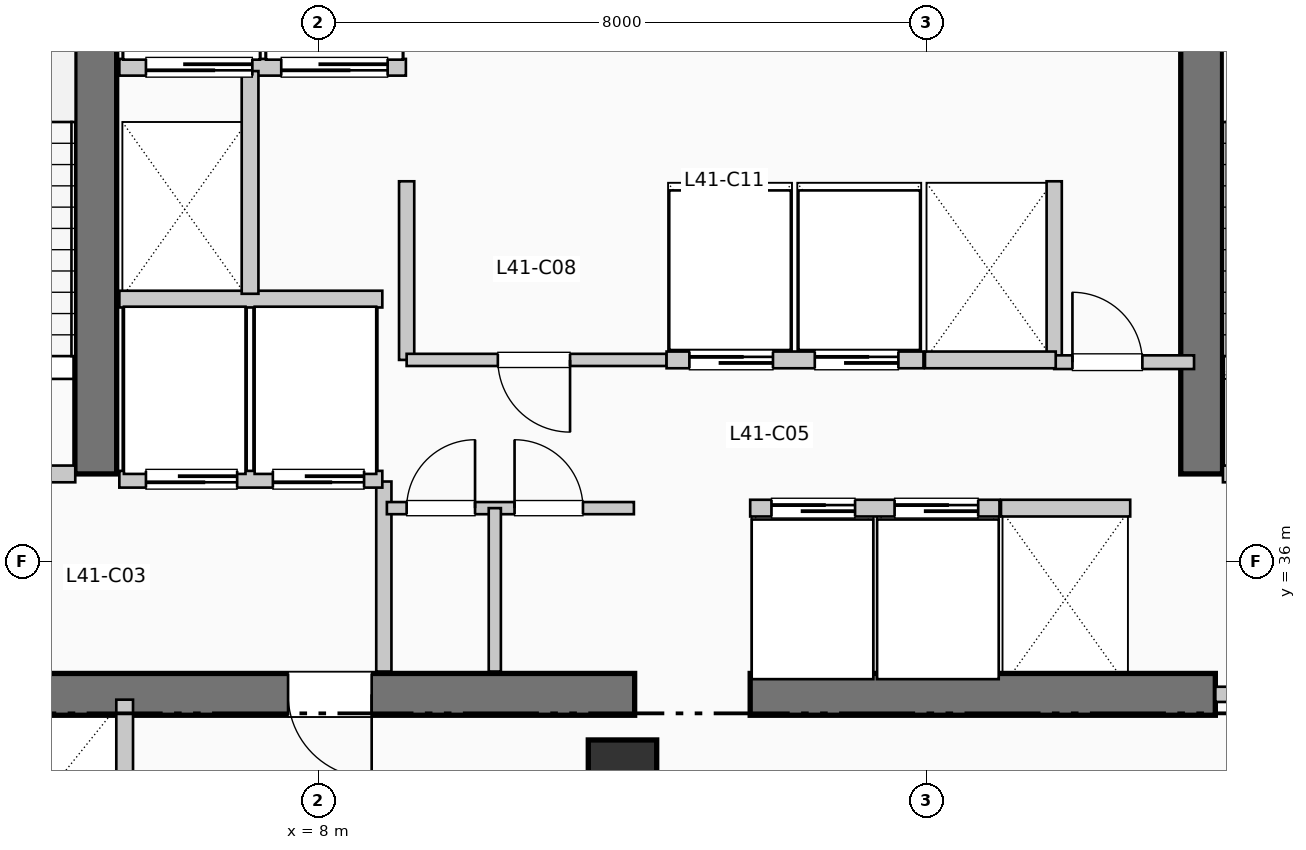
"""IFC4 building model, lengths in metres.
Left out: names, types, materials, properties, quantities, classifications, styles, units other than length and angle.
Written with IfcOpenShell. Run it as: python <this file> out.ifc"""

import sys

from ifc_helpers import new_model, si_unit, direction, frame, frame_2d, origin, origin_2d, place, context, subcontext, project, spatial, rectangle, extrude, element, fill, save


model = new_model("IFC4")
c1 = context("Model", 3, precision=1e-05, world=origin(), true_north=direction((0.0, 1.0)))
c2 = subcontext(c1, "Body", "Model", "MODEL_VIEW")
j1 = project(units=[si_unit("LENGTHUNIT", "METRE"), si_unit("PLANEANGLEUNIT", "RADIAN")], contexts=[c1])
p1 = place(None, origin())
s1 = spatial("IfcSite", under=j1, at=p1, CompositionType="ELEMENT")
p2 = place(p1, origin())
s2 = spatial("IfcBuilding", under=s1, at=p2, CompositionType="ELEMENT")
p3 = place(p2, frame((0.0, 0.0, 170.61)))
s3 = spatial("IfcBuildingStorey", under=s2, at=p3, CompositionType="ELEMENT", Elevation=170.61)
p4 = place(p3, frame((1.45, 34.25, 0.0), z_axis=(0.0, 0.0, 1.0), x_axis=(1.0, 0.0, 0.0)))
e1 = element("IfcWall", 1, at=p4, inside=s3, PredefinedType="SHEAR", context=c2, shape_type="SweptSolid", body=[
    extrude(rectangle(XDim=10.71, YDim=0.55, at=frame_2d((5.355, 0.0))), origin(), (0.0, 0.0, 1.0), 3.96),
])
p5 = place(p4, frame((7.25, 0.0, 0.0), z_axis=(0.0, 0.0, 1.0), x_axis=(-1.0, 0.0, 0.0)))
e2 = element("IfcOpeningElement", 2, at=p5, cuts=e1, PredefinedType="OPENING", context=c2, shape_type="SweptSolid", body=[
    extrude(rectangle(XDim=1.1, YDim=2.15, at=frame_2d((0.55, 1.075))), frame((0.0, 0.285, 0.0), z_axis=(0.0, -1.0, 0.0), x_axis=(1.0, 0.0, 0.0)), (0.0, 0.0, 1.0), 0.57),
])
p6 = place(p3, frame((13.68, 34.25, 0.0), z_axis=(0.0, 0.0, 1.0), x_axis=(1.0, 0.0, 0.0)))
e3 = element("IfcWall", 3, at=p6, inside=s3, PredefinedType="SHEAR", context=c2, shape_type="SweptSolid", body=[
    extrude(rectangle(XDim=6.12, YDim=0.55, at=frame_2d((3.06, 0.0))), origin(), (0.0, 0.0, 1.0), 3.96),
])
for number, where, z_axis, x_axis in (
    (4, (5.07, 37.15, 0.0), (0.0, 0.0, 1.0), (0.0, 1.0, 0.0)),
    (5, (19.62, 37.15, 0.0), (0.0, 0.0, 1.0), (0.0, 1.0, 0.0)),
):
    element("IfcWall", number, at=place(p3, frame(where, z_axis=z_axis, x_axis=x_axis)), inside=s3, PredefinedType="SHEAR", context=c2, shape_type="SweptSolid", body=[
        extrude(rectangle(XDim=7.89, YDim=0.55, at=frame_2d((3.945, 0.0))), origin(), (0.0, 0.0, 1.0), 3.96),
    ])
p7 = place(p3, frame((12.0, 33.2, 0.0), z_axis=(0.0, 0.0, 1.0), x_axis=(1.0, 0.0, 0.0)))
e6 = element("IfcColumn", 6, at=p7, inside=s3, PredefinedType="COLUMN", context=c2, shape_type="SweptSolid", body=[
    extrude(rectangle(XDim=0.9, YDim=0.9, at=origin_2d()), origin(), (0.0, 0.0, 1.0), 3.96),
])
p8 = place(p3, frame((1.65, 37.15, 0.0), z_axis=(0.0, 0.0, 1.0), x_axis=(1.0, 0.0, 0.0)))
e7 = element("IfcWall", 7, at=p8, inside=s3, PredefinedType="PARTITIONING", context=c2, shape_type="SweptSolid", body=[
    extrude(rectangle(XDim=3.15, YDim=0.22, at=frame_2d((1.575, 0.0))), origin(), (0.0, 0.0, 1.0), 3.61),
])
p9 = place(p8, frame((2.05, 0.0, 0.0), z_axis=(0.0, 0.0, 1.0), x_axis=(-1.0, 0.0, 0.0)))
e8 = element("IfcOpeningElement", 8, at=p9, cuts=e7, PredefinedType="OPENING", context=c2, shape_type="SweptSolid", body=[
    extrude(rectangle(XDim=1.05, YDim=2.15, at=frame_2d((0.525, 1.075))), frame((0.0, 0.12, 0.0), z_axis=(0.0, -1.0, 0.0), x_axis=(1.0, 0.0, 0.0)), (0.0, 0.0, 1.0), 0.24),
])
p10 = place(p3, frame((8.86, 34.55, 0.0), z_axis=(0.0, 0.0, 1.0), x_axis=(0.0, 1.0, 0.0)))
e9 = element("IfcWall", 9, at=p10, inside=s3, PredefinedType="PARTITIONING", context=c2, shape_type="SweptSolid", body=[
    extrude(rectangle(XDim=2.5, YDim=0.2, at=frame_2d((1.25, 0.0))), origin(), (0.0, 0.0, 1.0), 3.61),
])
p11 = place(p3, frame((19.9, 37.15, 0.0), z_axis=(0.0, 0.0, 1.0), x_axis=(1.0, 0.0, 0.0)))
e10 = element("IfcWall", 10, at=p11, inside=s3, PredefinedType="PARTITIONING", context=c2, shape_type="SweptSolid", body=[
    extrude(rectangle(XDim=3.15, YDim=0.22, at=frame_2d((1.575, 0.0))), origin(), (0.0, 0.0, 1.0), 3.61),
])
p12 = place(p11, frame((2.05, 0.0, 0.0), z_axis=(0.0, 0.0, 1.0), x_axis=(-1.0, 0.0, 0.0)))
e11 = element("IfcOpeningElement", 11, at=p12, cuts=e10, PredefinedType="OPENING", context=c2, shape_type="SweptSolid", body=[
    extrude(rectangle(XDim=1.05, YDim=2.15, at=frame_2d((0.525, 1.075))), frame((0.0, 0.12, 0.0), z_axis=(0.0, -1.0, 0.0), x_axis=(1.0, 0.0, 0.0)), (0.0, 0.0, 1.0), 0.24),
])
p13 = place(p3, frame((19.8, 34.25, 0.0), z_axis=(0.0, 0.0, 1.0), x_axis=(1.0, 0.0, 0.0)))
e12 = element("IfcWall", 12, at=p13, inside=s3, PredefinedType="PARTITIONING", context=c2, shape_type="SweptSolid", body=[
    extrude(rectangle(XDim=3.25, YDim=0.2, at=frame_2d((1.625, 0.0))), origin(), (0.0, 0.0, 1.0), 3.61),
])
p14 = place(p13, frame((2.15, 0.0, 0.0), z_axis=(0.0, 0.0, 1.0), x_axis=(-1.0, 0.0, 0.0)))
e13 = element("IfcOpeningElement", 13, at=p14, cuts=e12, PredefinedType="OPENING", context=c2, shape_type="SweptSolid", body=[
    extrude(rectangle(XDim=1.1, YDim=2.15, at=frame_2d((0.55, 1.075))), frame((0.0, 0.11, 0.0), z_axis=(0.0, -1.0, 0.0), x_axis=(1.0, 0.0, 0.0)), (0.0, 0.0, 1.0), 0.22),
])
p15 = place(p3, frame((5.38, 37.08, 0.0), z_axis=(0.0, 0.0, 1.0), x_axis=(1.0, 0.0, 0.0)))
e14 = element("IfcWall", 14, at=p15, inside=s3, PredefinedType="PARTITIONING", context=c2, shape_type="SweptSolid", body=[
    extrude(rectangle(XDim=3.46, YDim=0.22, at=frame_2d((1.73, 0.0))), origin(), (0.0, 0.0, 1.0), 3.61),
])
p16 = place(p15, frame((1.55, 0.0, 0.0), z_axis=(0.0, 0.0, 1.0), x_axis=(-1.0, 0.0, 0.0)))
e15 = element("IfcOpeningElement", 15, at=p16, cuts=e14, PredefinedType="OPENING", context=c2, shape_type="SweptSolid", body=[
    extrude(rectangle(XDim=1.2, YDim=2.2, at=frame_2d((0.6, 1.1))), frame((0.0, 0.12, 0.0), z_axis=(0.0, -1.0, 0.0), x_axis=(1.0, 0.0, 0.0)), (0.0, 0.0, 1.0), 0.24),
])
p17 = place(p15, frame((3.22, 0.0, 0.0), z_axis=(0.0, 0.0, 1.0), x_axis=(-1.0, 0.0, 0.0)))
e16 = element("IfcOpeningElement", 16, at=p17, cuts=e14, PredefinedType="OPENING", context=c2, shape_type="SweptSolid", body=[
    extrude(rectangle(XDim=1.2, YDim=2.2, at=frame_2d((0.6, 1.1))), frame((0.0, 0.12, 0.0), z_axis=(0.0, -1.0, 0.0), x_axis=(1.0, 0.0, 0.0)), (0.0, 0.0, 1.0), 0.24),
])
p18 = place(p3, frame((5.38, 39.45, 0.0), z_axis=(0.0, 0.0, 1.0), x_axis=(1.0, 0.0, 0.0)))
e17 = element("IfcWall", 17, at=p18, inside=s3, PredefinedType="PARTITIONING", context=c2, shape_type="SweptSolid", body=[
    extrude(rectangle(XDim=3.46, YDim=0.22, at=frame_2d((1.73, 0.0))), origin(), (0.0, 0.0, 1.0), 3.61),
])
p19 = place(p3, frame((5.38, 42.5, 0.0), z_axis=(0.0, 0.0, 1.0), x_axis=(1.0, 0.0, 0.0)))
e18 = element("IfcWall", 18, at=p19, inside=s3, PredefinedType="PARTITIONING", context=c2, shape_type="SweptSolid", body=[
    extrude(rectangle(XDim=3.77, YDim=0.22, at=frame_2d((1.885, 0.0))), origin(), (0.0, 0.0, 1.0), 3.61),
])
p20 = place(p19, frame((1.75, 0.0, 0.0), z_axis=(0.0, 0.0, 1.0), x_axis=(-1.0, 0.0, 0.0)))
e19 = element("IfcOpeningElement", 19, at=p20, cuts=e18, PredefinedType="OPENING", context=c2, shape_type="SweptSolid", body=[
    extrude(rectangle(XDim=1.4, YDim=2.2, at=frame_2d((0.7, 1.1))), frame((0.0, 0.12, 0.0), z_axis=(0.0, -1.0, 0.0), x_axis=(1.0, 0.0, 0.0)), (0.0, 0.0, 1.0), 0.24),
])
p21 = place(p19, frame((3.53, 0.0, 0.0), z_axis=(0.0, 0.0, 1.0), x_axis=(-1.0, 0.0, 0.0)))
e20 = element("IfcOpeningElement", 20, at=p21, cuts=e18, PredefinedType="OPENING", context=c2, shape_type="SweptSolid", body=[
    extrude(rectangle(XDim=1.4, YDim=2.2, at=frame_2d((0.7, 1.1))), frame((0.0, 0.12, 0.0), z_axis=(0.0, -1.0, 0.0), x_axis=(1.0, 0.0, 0.0)), (0.0, 0.0, 1.0), 0.24),
])
p22 = place(p3, frame((7.1, 39.52, 0.0), z_axis=(0.0, 0.0, 1.0), x_axis=(0.0, 1.0, 0.0)))
e21 = element("IfcWall", 21, at=p22, inside=s3, PredefinedType="PARTITIONING", context=c2, shape_type="SweptSolid", body=[
    extrude(rectangle(XDim=2.93, YDim=0.22, at=frame_2d((1.465, 0.0))), origin(), (0.0, 0.0, 1.0), 3.61),
])
p23 = place(p3, frame((5.45, 31.8, 0.0), z_axis=(0.0, 0.0, 1.0), x_axis=(0.0, 1.0, 0.0)))
e22 = element("IfcWall", 22, at=p23, inside=s3, PredefinedType="PARTITIONING", context=c2, shape_type="SweptSolid", body=[
    extrude(rectangle(XDim=2.38, YDim=0.22, at=frame_2d((1.19, 0.0))), origin(), (0.0, 0.0, 1.0), 3.61),
])
for number, where, z_axis, x_axis in (
    (23, (9.16, 38.65, 0.0), (0.0, 0.0, 1.0), (0.0, 1.0, 0.0)),
    (24, (17.68, 38.65, 0.0), (0.0, 0.0, 1.0), (0.0, 1.0, 0.0)),
):
    element("IfcWall", number, at=place(p3, frame(where, z_axis=z_axis, x_axis=x_axis)), inside=s3, PredefinedType="PARTITIONING", context=c2, shape_type="SweptSolid", body=[
        extrude(rectangle(XDim=2.35, YDim=0.2, at=frame_2d((1.175, 0.0))), origin(), (0.0, 0.0, 1.0), 3.61),
    ])
p24 = place(p3, frame((17.68, 38.62, 0.0), z_axis=(0.0, 0.0, 1.0), x_axis=(1.0, 0.0, 0.0)))
e25 = element("IfcWall", 25, at=p24, inside=s3, PredefinedType="PARTITIONING", context=c2, shape_type="SweptSolid", body=[
    extrude(rectangle(XDim=1.84, YDim=0.18, at=frame_2d((0.92, 0.0))), origin(), (0.0, 0.0, 1.0), 3.61),
])
p25 = place(p24, frame((0.24, 0.0, 0.0)))
e26 = element("IfcOpeningElement", 26, at=p25, cuts=e25, PredefinedType="OPENING", context=c2, shape_type="SweptSolid", body=[
    extrude(rectangle(XDim=0.92, YDim=2.1, at=frame_2d((0.46, 1.05))), frame((0.0, 0.1, 0.0), z_axis=(0.0, -1.0, 0.0), x_axis=(1.0, 0.0, 0.0)), (0.0, 0.0, 1.0), 0.2),
])
p26 = place(p3, frame((8.9, 36.7, 0.0), z_axis=(0.0, 0.0, 1.0), x_axis=(1.0, 0.0, 0.0)))
e27 = element("IfcWall", 27, at=p26, inside=s3, PredefinedType="PARTITIONING", context=c2, shape_type="SweptSolid", body=[
    extrude(rectangle(XDim=3.25, YDim=0.16, at=frame_2d((1.625, 0.0))), origin(), (0.0, 0.0, 1.0), 3.61),
])
p27 = place(p26, frame((0.26, 0.0, 0.0)))
e28 = element("IfcOpeningElement", 28, at=p27, cuts=e27, PredefinedType="OPENING", context=c2, shape_type="SweptSolid", body=[
    extrude(rectangle(XDim=0.9, YDim=2.15, at=frame_2d((0.45, 1.075))), frame((0.0, 0.09, 0.0), z_axis=(0.0, -1.0, 0.0), x_axis=(1.0, 0.0, 0.0)), (0.0, 0.0, 1.0), 0.18),
])
p28 = place(p26, frame((1.68, 0.0, 0.0)))
e29 = element("IfcOpeningElement", 29, at=p28, cuts=e27, PredefinedType="OPENING", context=c2, shape_type="SweptSolid", body=[
    extrude(rectangle(XDim=0.9, YDim=2.15, at=frame_2d((0.45, 1.075))), frame((0.0, 0.09, 0.0), z_axis=(0.0, -1.0, 0.0), x_axis=(1.0, 0.0, 0.0)), (0.0, 0.0, 1.0), 0.18),
])
p29 = place(p3, frame((10.32, 34.55, 0.0), z_axis=(0.0, 0.0, 1.0), x_axis=(0.0, 1.0, 0.0)))
e30 = element("IfcWall", 30, at=p29, inside=s3, PredefinedType="PARTITIONING", context=c2, shape_type="SweptSolid", body=[
    extrude(rectangle(XDim=2.15, YDim=0.16, at=frame_2d((1.075, 0.0))), origin(), (0.0, 0.0, 1.0), 3.61),
])
p30 = place(p3, frame((9.16, 38.65, 0.0), z_axis=(0.0, 0.0, 1.0), x_axis=(1.0, 0.0, 0.0)))
e31 = element("IfcWall", 31, at=p30, inside=s3, PredefinedType="PARTITIONING", context=c2, shape_type="SweptSolid", body=[
    extrude(rectangle(XDim=3.42, YDim=0.16, at=frame_2d((1.71, 0.0))), origin(), (0.0, 0.0, 1.0), 3.61),
])
p31 = place(p30, frame((2.15, 0.0, 0.0), z_axis=(0.0, 0.0, 1.0), x_axis=(-1.0, 0.0, 0.0)))
e32 = element("IfcOpeningElement", 32, at=p31, cuts=e31, PredefinedType="OPENING", context=c2, shape_type="SweptSolid", body=[
    extrude(rectangle(XDim=0.95, YDim=2.15, at=frame_2d((0.475, 1.075))), frame((0.0, 0.09, 0.0), z_axis=(0.0, -1.0, 0.0), x_axis=(1.0, 0.0, 0.0)), (0.0, 0.0, 1.0), 0.18),
])
p32 = place(p3, frame((13.68, 36.7, 0.0), z_axis=(0.0, 0.0, 1.0), x_axis=(1.0, 0.0, 0.0)))
e33 = element("IfcWall", 33, at=p32, inside=s3, PredefinedType="PARTITIONING", context=c2, shape_type="SweptSolid", body=[
    extrude(rectangle(XDim=3.28, YDim=0.22, at=frame_2d((1.64, 0.0))), origin(), (0.0, 0.0, 1.0), 3.61),
])
p33 = place(p32, frame((0.28, 0.0, 0.0)))
e34 = element("IfcOpeningElement", 34, at=p33, cuts=e33, PredefinedType="OPENING", context=c2, shape_type="SweptSolid", body=[
    extrude(rectangle(XDim=1.1, YDim=2.2, at=frame_2d((0.55, 1.1))), frame((0.0, 0.12, 0.0), z_axis=(0.0, -1.0, 0.0), x_axis=(1.0, 0.0, 0.0)), (0.0, 0.0, 1.0), 0.24),
])
p34 = place(p32, frame((1.9, 0.0, 0.0)))
e35 = element("IfcOpeningElement", 35, at=p34, cuts=e33, PredefinedType="OPENING", context=c2, shape_type="SweptSolid", body=[
    extrude(rectangle(XDim=1.1, YDim=2.2, at=frame_2d((0.55, 1.1))), frame((0.0, 0.12, 0.0), z_axis=(0.0, -1.0, 0.0), x_axis=(1.0, 0.0, 0.0)), (0.0, 0.0, 1.0), 0.24),
])
p35 = place(p3, frame((12.58, 38.65, 0.0), z_axis=(0.0, 0.0, 1.0), x_axis=(1.0, 0.0, 0.0)))
e36 = element("IfcWall", 36, at=p35, inside=s3, PredefinedType="PARTITIONING", context=c2, shape_type="SweptSolid", body=[
    extrude(rectangle(XDim=3.38, YDim=0.22, at=frame_2d((1.69, 0.0))), origin(), (0.0, 0.0, 1.0), 3.61),
])
p36 = place(p35, frame((0.3, 0.0, 0.0)))
e37 = element("IfcOpeningElement", 37, at=p36, cuts=e36, PredefinedType="OPENING", context=c2, shape_type="SweptSolid", body=[
    extrude(rectangle(XDim=1.1, YDim=2.2, at=frame_2d((0.55, 1.1))), frame((0.0, 0.12, 0.0), z_axis=(0.0, -1.0, 0.0), x_axis=(1.0, 0.0, 0.0)), (0.0, 0.0, 1.0), 0.24),
])
p37 = place(p35, frame((1.95, 0.0, 0.0)))
e38 = element("IfcOpeningElement", 38, at=p37, cuts=e36, PredefinedType="OPENING", context=c2, shape_type="SweptSolid", body=[
    extrude(rectangle(XDim=1.1, YDim=2.2, at=frame_2d((0.55, 1.1))), frame((0.0, 0.12, 0.0), z_axis=(0.0, -1.0, 0.0), x_axis=(1.0, 0.0, 0.0)), (0.0, 0.0, 1.0), 0.24),
])
p38 = place(p3, frame((16.98, 36.7, 0.0), z_axis=(0.0, 0.0, 1.0), x_axis=(1.0, 0.0, 0.0)))
e39 = element("IfcWall", 39, at=p38, inside=s3, PredefinedType="PARTITIONING", context=c2, shape_type="SweptSolid", body=[
    extrude(rectangle(XDim=1.7, YDim=0.22, at=frame_2d((0.85, 0.0))), origin(), (0.0, 0.0, 1.0), 3.61),
])
p39 = place(p3, frame((15.98, 38.65, 0.0), z_axis=(0.0, 0.0, 1.0), x_axis=(1.0, 0.0, 0.0)))
e40 = element("IfcWall", 40, at=p39, inside=s3, PredefinedType="PARTITIONING", context=c2, shape_type="SweptSolid", body=[
    extrude(rectangle(XDim=1.72, YDim=0.22, at=frame_2d((0.86, 0.0))), origin(), (0.0, 0.0, 1.0), 3.61),
])
p40 = place(p5, origin())
e41 = element("IfcDoor", 41, at=p40, inside=s3, OperationType="SINGLE_SWING_RIGHT", PredefinedType="DOOR", context=c2, shape_type="SweptSolid", body=[
    extrude(rectangle(XDim=1.1, YDim=2.15, at=frame_2d((0.55, 1.075))), frame((0.0, 0.025, 0.0), z_axis=(0.0, -1.0, 0.0), x_axis=(1.0, 0.0, 0.0)), (0.0, 0.0, 1.0), 0.05),
])
fill(e2, e41)
p41 = place(p16, origin())
e42 = element("IfcDoor", 42, at=p41, inside=s3, OperationType="SLIDING_TO_RIGHT", PredefinedType="DOOR", context=c2, shape_type="SweptSolid", body=[
    extrude(rectangle(XDim=1.2, YDim=2.2, at=frame_2d((0.6, 1.1))), frame((0.0, 0.025, 0.0), z_axis=(0.0, -1.0, 0.0), x_axis=(1.0, 0.0, 0.0)), (0.0, 0.0, 1.0), 0.05),
])
fill(e15, e42)
p42 = place(p17, origin())
e43 = element("IfcDoor", 43, at=p42, inside=s3, OperationType="SLIDING_TO_RIGHT", PredefinedType="DOOR", context=c2, shape_type="SweptSolid", body=[
    extrude(rectangle(XDim=1.2, YDim=2.2, at=frame_2d((0.6, 1.1))), frame((0.0, 0.025, 0.0), z_axis=(0.0, -1.0, 0.0), x_axis=(1.0, 0.0, 0.0)), (0.0, 0.0, 1.0), 0.05),
])
fill(e16, e43)
p43 = place(p20, origin())
e44 = element("IfcDoor", 44, at=p43, inside=s3, OperationType="SLIDING_TO_LEFT", PredefinedType="DOOR", context=c2, shape_type="SweptSolid", body=[
    extrude(rectangle(XDim=1.4, YDim=2.2, at=frame_2d((0.7, 1.1))), frame((0.0, 0.025, 0.0), z_axis=(0.0, -1.0, 0.0), x_axis=(1.0, 0.0, 0.0)), (0.0, 0.0, 1.0), 0.05),
])
fill(e19, e44)
p44 = place(p21, origin())
e45 = element("IfcDoor", 45, at=p44, inside=s3, OperationType="SLIDING_TO_LEFT", PredefinedType="DOOR", context=c2, shape_type="SweptSolid", body=[
    extrude(rectangle(XDim=1.4, YDim=2.2, at=frame_2d((0.7, 1.1))), frame((0.0, 0.025, 0.0), z_axis=(0.0, -1.0, 0.0), x_axis=(1.0, 0.0, 0.0)), (0.0, 0.0, 1.0), 0.05),
])
fill(e20, e45)
p45 = place(p25, origin())
e46 = element("IfcDoor", 46, at=p45, inside=s3, OperationType="SINGLE_SWING_LEFT", PredefinedType="DOOR", context=c2, shape_type="SweptSolid", body=[
    extrude(rectangle(XDim=0.92, YDim=2.1, at=frame_2d((0.46, 1.05))), frame((0.0, 0.025, 0.0), z_axis=(0.0, -1.0, 0.0), x_axis=(1.0, 0.0, 0.0)), (0.0, 0.0, 1.0), 0.05),
])
fill(e26, e46)
p46 = place(p27, origin())
e47 = element("IfcDoor", 47, at=p46, inside=s3, OperationType="SINGLE_SWING_RIGHT", PredefinedType="DOOR", context=c2, shape_type="SweptSolid", body=[
    extrude(rectangle(XDim=0.9, YDim=2.15, at=frame_2d((0.45, 1.075))), frame((0.0, 0.025, 0.0), z_axis=(0.0, -1.0, 0.0), x_axis=(1.0, 0.0, 0.0)), (0.0, 0.0, 1.0), 0.05),
])
fill(e28, e47)
p47 = place(p28, origin())
e48 = element("IfcDoor", 48, at=p47, inside=s3, OperationType="SINGLE_SWING_LEFT", PredefinedType="DOOR", context=c2, shape_type="SweptSolid", body=[
    extrude(rectangle(XDim=0.9, YDim=2.15, at=frame_2d((0.45, 1.075))), frame((0.0, 0.025, 0.0), z_axis=(0.0, -1.0, 0.0), x_axis=(1.0, 0.0, 0.0)), (0.0, 0.0, 1.0), 0.05),
])
fill(e29, e48)
p48 = place(p31, origin())
e49 = element("IfcDoor", 49, at=p48, inside=s3, OperationType="SINGLE_SWING_RIGHT", PredefinedType="DOOR", context=c2, shape_type="SweptSolid", body=[
    extrude(rectangle(XDim=0.95, YDim=2.15, at=frame_2d((0.475, 1.075))), frame((0.0, 0.025, 0.0), z_axis=(0.0, -1.0, 0.0), x_axis=(1.0, 0.0, 0.0)), (0.0, 0.0, 1.0), 0.05),
])
fill(e32, e49)
p49 = place(p33, origin())
e50 = element("IfcDoor", 50, at=p49, inside=s3, OperationType="SLIDING_TO_RIGHT", PredefinedType="DOOR", context=c2, shape_type="SweptSolid", body=[
    extrude(rectangle(XDim=1.1, YDim=2.2, at=frame_2d((0.55, 1.1))), frame((0.0, 0.025, 0.0), z_axis=(0.0, -1.0, 0.0), x_axis=(1.0, 0.0, 0.0)), (0.0, 0.0, 1.0), 0.05),
])
fill(e34, e50)
p50 = place(p34, origin())
e51 = element("IfcDoor", 51, at=p50, inside=s3, OperationType="SLIDING_TO_RIGHT", PredefinedType="DOOR", context=c2, shape_type="SweptSolid", body=[
    extrude(rectangle(XDim=1.1, YDim=2.2, at=frame_2d((0.55, 1.1))), frame((0.0, 0.025, 0.0), z_axis=(0.0, -1.0, 0.0), x_axis=(1.0, 0.0, 0.0)), (0.0, 0.0, 1.0), 0.05),
])
fill(e35, e51)
p51 = place(p36, origin())
e52 = element("IfcDoor", 52, at=p51, inside=s3, OperationType="SLIDING_TO_RIGHT", PredefinedType="DOOR", context=c2, shape_type="SweptSolid", body=[
    extrude(rectangle(XDim=1.1, YDim=2.2, at=frame_2d((0.55, 1.1))), frame((0.0, 0.025, 0.0), z_axis=(0.0, -1.0, 0.0), x_axis=(1.0, 0.0, 0.0)), (0.0, 0.0, 1.0), 0.05),
])
fill(e37, e52)
p52 = place(p37, origin())
e53 = element("IfcDoor", 53, at=p52, inside=s3, OperationType="SLIDING_TO_RIGHT", PredefinedType="DOOR", context=c2, shape_type="SweptSolid", body=[
    extrude(rectangle(XDim=1.1, YDim=2.2, at=frame_2d((0.55, 1.1))), frame((0.0, 0.025, 0.0), z_axis=(0.0, -1.0, 0.0), x_axis=(1.0, 0.0, 0.0)), (0.0, 0.0, 1.0), 0.05),
])
fill(e38, e53)
save(model, sys.argv[1])
